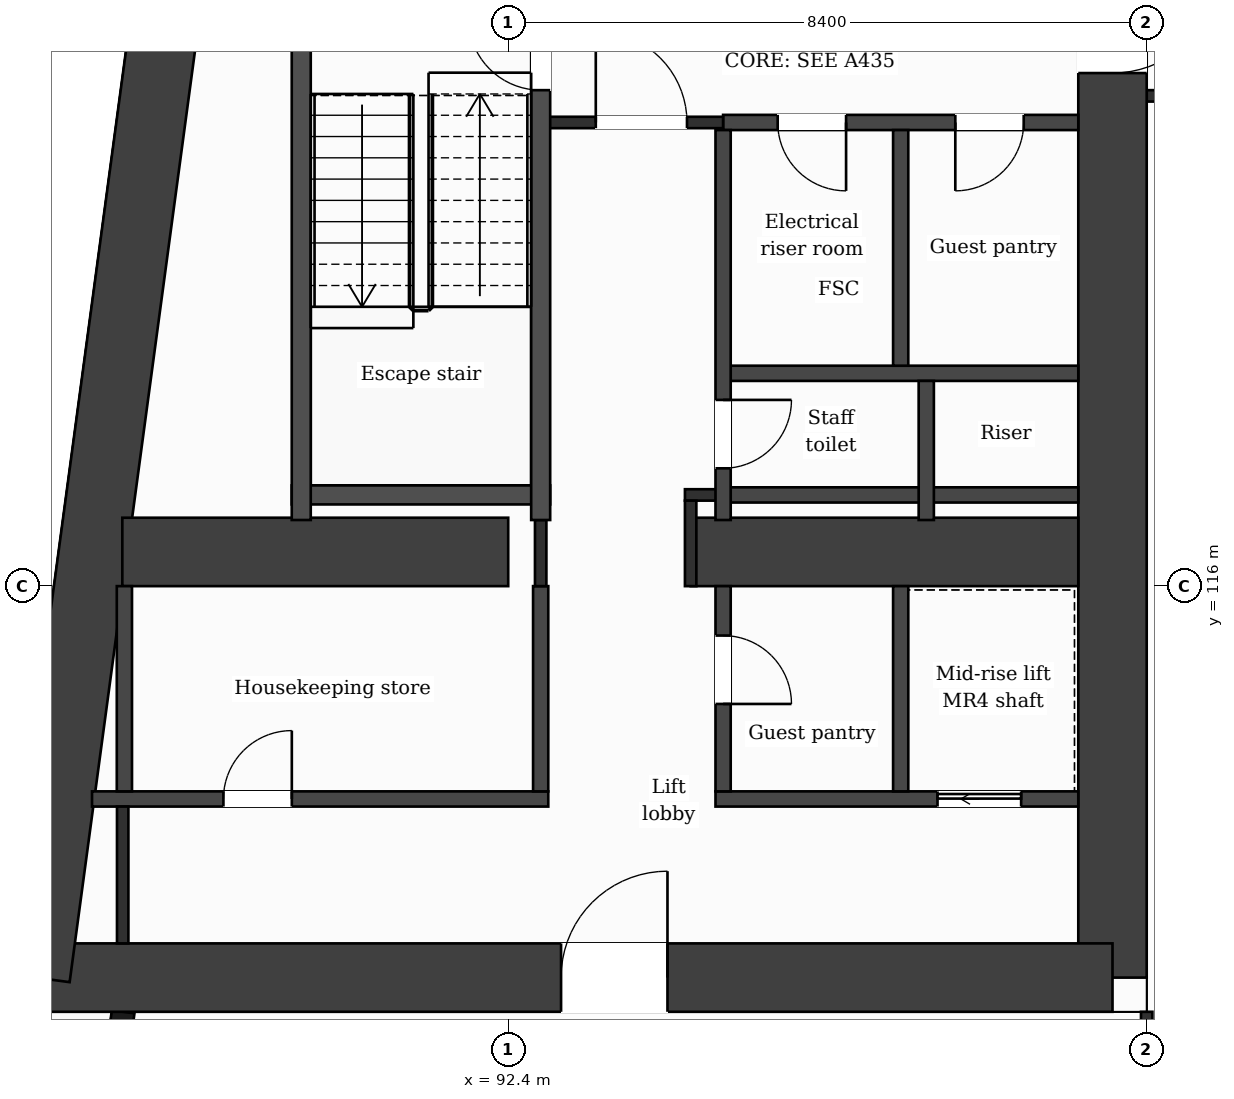
"""IFC4 building model, lengths in metres.
Left out: names, types, materials, properties, quantities, classifications, styles, units other than length and angle.
Written with IfcOpenShell. Run it as: python <this file> out.ifc"""

import sys

from ifc_helpers import new_model, si_unit, direction, frame, frame_2d, origin, place, context, subcontext, project, spatial, rectangle, extrude, element, fill, save


model = new_model("IFC4")
c1 = context("Model", 3, precision=1e-05, world=origin(), true_north=direction((0.0, 1.0)))
c2 = subcontext(c1, "Body", "Model", "MODEL_VIEW")
j1 = project(units=[si_unit("LENGTHUNIT", "METRE"), si_unit("PLANEANGLEUNIT", "RADIAN")], contexts=[c1])
p1 = place(None, origin())
s1 = spatial("IfcSite", under=j1, at=p1, CompositionType="ELEMENT")
p2 = place(p1, origin())
s2 = spatial("IfcBuilding", under=s1, at=p2, CompositionType="ELEMENT")
p3 = place(p2, frame((0.0, 0.0, 147.8)))
s3 = spatial("IfcBuildingStorey", under=s2, at=p3, CompositionType="ELEMENT", Elevation=147.8)
p4 = place(p3, frame((100.35, 131.95, 0.0), z_axis=(0.0, 0.0, 1.0), x_axis=(0.0, -1.0, 0.0)))
e1 = element("IfcWall", 1, at=p4, inside=s3, PredefinedType="SHEAR", context=c2, shape_type="SweptSolid", body=[
    extrude(rectangle(XDim=21.1, YDim=0.9, at=frame_2d((10.55, 0.0))), origin(), (0.0, 0.0, 1.0), 3.7),
])
p5 = place(p4, frame((7.8, 0.0, 0.0)))
e2 = element("IfcOpeningElement", 2, at=p5, cuts=e1, PredefinedType="OPENING", context=c2, shape_type="SweptSolid", body=[
    extrude(rectangle(XDim=1.4, YDim=2.1, at=frame_2d((0.7, 1.05))), frame((0.0, 0.46, 0.0), z_axis=(0.0, -1.0, 0.0), x_axis=(1.0, 0.0, 0.0)), (0.0, 0.0, 1.0), 0.92),
])
p6 = place(p3, frame((100.35, 110.85, 0.0), z_axis=(0.0, 0.0, 1.0), x_axis=(-1.0, 0.0, 0.0)))
e3 = element("IfcWall", 3, at=p6, inside=s3, PredefinedType="SHEAR", context=c2, shape_type="SweptSolid", body=[
    extrude(rectangle(XDim=14.166, YDim=0.9, at=frame_2d((7.083, 0.0))), origin(), (0.0, 0.0, 1.0), 3.7),
])
p7 = place(p6, frame((5.855, 0.0, 0.0)))
e4 = element("IfcOpeningElement", 4, at=p7, cuts=e3, PredefinedType="OPENING", context=c2, shape_type="SweptSolid", body=[
    extrude(rectangle(XDim=1.4, YDim=2.1, at=frame_2d((0.7, 1.05))), frame((0.0, 0.46, 0.0), z_axis=(0.0, -1.0, 0.0), x_axis=(1.0, 0.0, 0.0)), (0.0, 0.0, 1.0), 0.92),
])
p8 = place(p3, frame((86.184, 110.85, 0.0), z_axis=(0.0, 0.0, 1.0), x_axis=(0.133410495943, 0.991060865725, 0.0)))
e5 = element("IfcWall", 5, at=p8, inside=s3, PredefinedType="SHEAR", context=c2, shape_type="SweptSolid", body=[
    extrude(rectangle(XDim=21.29, YDim=0.9, at=frame_2d((10.645, 0.0))), origin(), (0.0, 0.0, 1.0), 3.7),
])
p9 = place(p3, frame((87.323, 116.45, 0.0), z_axis=(0.0, 0.0, 1.0), x_axis=(1.0, 0.0, 0.0)))
e6 = element("IfcWall", 6, at=p9, inside=s3, PredefinedType="SHEAR", context=c2, shape_type="SweptSolid", body=[
    extrude(rectangle(XDim=5.077, YDim=0.9, at=frame_2d((2.539, 0.0))), origin(), (0.0, 0.0, 1.0), 3.7),
])
p10 = place(p3, frame((94.8, 116.45, 0.0), z_axis=(0.0, 0.0, 1.0), x_axis=(1.0, 0.0, 0.0)))
e7 = element("IfcWall", 7, at=p10, inside=s3, PredefinedType="SHEAR", context=c2, shape_type="SweptSolid", body=[
    extrude(rectangle(XDim=5.1, YDim=0.9, at=frame_2d((2.55, 0.0))), origin(), (0.0, 0.0, 1.0), 3.7),
])
p11 = place(p3, frame((87.334, 110.4, 0.0), z_axis=(0.0, 0.0, 1.0), x_axis=(-0.133437175554, -0.991057273915, 0.0)))
e8 = element("IfcWall", 8, at=p11, inside=s3, PredefinedType="SOLIDWALL", context=c2, shape_type="SweptSolid", body=[
    extrude(rectangle(XDim=6.781, YDim=0.3, at=frame_2d((3.39, 0.0))), origin(), (0.0, 0.0, 1.0), 3.38),
])
p12 = place(p11, frame((1.418, 0.0, 0.0)))
e9 = element("IfcOpeningElement", 9, at=p12, cuts=e8, PredefinedType="OPENING", context=c2, shape_type="SweptSolid", body=[
    extrude(rectangle(XDim=1.2, YDim=2.4, at=frame_2d((0.6, 1.2))), frame((0.0, 0.16, 0.0), z_axis=(0.0, -1.0, 0.0), x_axis=(1.0, 0.0, 0.0)), (0.0, 0.0, 1.0), 0.32),
])
p13 = place(p11, frame((4.758, 0.0, 0.9)))
e10 = element("IfcOpeningElement", 10, at=p13, cuts=e8, PredefinedType="OPENING", context=c2, shape_type="SweptSolid", body=[
    extrude(rectangle(XDim=1.2, YDim=2.1, at=frame_2d((0.6, 1.05))), frame((0.0, 0.16, 0.0), z_axis=(0.0, -1.0, 0.0), x_axis=(1.0, 0.0, 0.0)), (0.0, 0.0, 1.0), 0.32),
])
p14 = place(p3, frame((86.924, 113.2, 0.0), z_axis=(0.0, 0.0, 1.0), x_axis=(1.0, 0.0, 0.0)))
e11 = element("IfcWall", 11, at=p14, inside=s3, PredefinedType="PARTITIONING", context=c2, shape_type="SweptSolid", body=[
    extrude(rectangle(XDim=6.003, YDim=0.2, at=frame_2d((3.001, 0.0))), origin(), (0.0, 0.0, 1.0), 3.38),
])
p15 = place(p14, frame((1.729, 0.0, 0.0)))
e12 = element("IfcOpeningElement", 12, at=p15, cuts=e11, PredefinedType="OPENING", context=c2, shape_type="SweptSolid", body=[
    extrude(rectangle(XDim=0.9, YDim=2.1, at=frame_2d((0.45, 1.05))), frame((0.0, 0.11, 0.0), z_axis=(0.0, -1.0, 0.0), x_axis=(1.0, 0.0, 0.0)), (0.0, 0.0, 1.0), 0.22),
])
p16 = place(p3, frame((95.127, 113.2, 0.0), z_axis=(0.0, 0.0, 1.0), x_axis=(1.0, 0.0, 0.0)))
e13 = element("IfcWall", 13, at=p16, inside=s3, PredefinedType="PARTITIONING", context=c2, shape_type="SweptSolid", body=[
    extrude(rectangle(XDim=4.773, YDim=0.2, at=frame_2d((2.386, 0.0))), origin(), (0.0, 0.0, 1.0), 3.38),
])
p17 = place(p16, frame((2.921, 0.0, 0.0)))
e14 = element("IfcOpeningElement", 14, at=p17, cuts=e13, PredefinedType="OPENING", context=c2, shape_type="SweptSolid", body=[
    extrude(rectangle(XDim=1.1, YDim=2.1, at=frame_2d((0.55, 1.05))), frame((0.0, 0.11, 0.0), z_axis=(0.0, -1.0, 0.0), x_axis=(1.0, 0.0, 0.0)), (0.0, 0.0, 1.0), 0.22),
])
p18 = place(p3, frame((95.227, 117.2, 0.0), z_axis=(0.0, 0.0, 1.0), x_axis=(1.0, 0.0, 0.0)))
e15 = element("IfcWall", 15, at=p18, inside=s3, PredefinedType="PARTITIONING", context=c2, shape_type="SweptSolid", body=[
    extrude(rectangle(XDim=4.673, YDim=0.2, at=frame_2d((2.336, 0.0))), origin(), (0.0, 0.0, 1.0), 3.38),
])
p19 = place(p3, frame((94.725, 117.2, 0.0), z_axis=(0.0, 0.0, 1.0), x_axis=(1.0, 0.0, 0.0)))
e16 = element("IfcWall", 16, at=p19, inside=s3, PredefinedType="PARTITIONING", context=c2, shape_type="SweptSolid", body=[
    extrude(rectangle(XDim=0.502, YDim=0.15, at=frame_2d((0.251, 0.0))), origin(), (0.0, 0.0, 1.0), 3.38),
])
p20 = place(p3, frame((89.552, 117.2, 0.0), z_axis=(0.0, 0.0, 1.0), x_axis=(1.0, 0.0, 0.0)))
e17 = element("IfcWall", 17, at=p20, inside=s3, PredefinedType="PARTITIONING", context=c2, shape_type="SweptSolid", body=[
    extrude(rectangle(XDim=3.4, YDim=0.25, at=frame_2d((1.7, 0.0))), origin(), (0.0, 0.0, 1.0), 3.38),
])
p21 = place(p3, frame((95.227, 118.8, 0.0), z_axis=(0.0, 0.0, 1.0), x_axis=(1.0, 0.0, 0.0)))
e18 = element("IfcWall", 18, at=p21, inside=s3, PredefinedType="PARTITIONING", context=c2, shape_type="SweptSolid", body=[
    extrude(rectangle(XDim=4.673, YDim=0.2, at=frame_2d((2.336, 0.0))), origin(), (0.0, 0.0, 1.0), 3.38),
])
p22 = place(p3, frame((95.227, 122.1, 0.0), z_axis=(0.0, 0.0, 1.0), x_axis=(1.0, 0.0, 0.0)))
e19 = element("IfcWall", 19, at=p22, inside=s3, PredefinedType="PARTITIONING", context=c2, shape_type="SweptSolid", body=[
    extrude(rectangle(XDim=4.673, YDim=0.2, at=frame_2d((2.336, 0.0))), origin(), (0.0, 0.0, 1.0), 3.38),
])
p23 = place(p22, frame((0.718, 0.0, 0.0)))
e20 = element("IfcOpeningElement", 20, at=p23, cuts=e19, PredefinedType="OPENING", context=c2, shape_type="SweptSolid", body=[
    extrude(rectangle(XDim=0.9, YDim=2.1, at=frame_2d((0.45, 1.05))), frame((0.0, 0.11, 0.0), z_axis=(0.0, -1.0, 0.0), x_axis=(1.0, 0.0, 0.0)), (0.0, 0.0, 1.0), 0.22),
])
p24 = place(p22, frame((3.055, 0.0, 0.0)))
e21 = element("IfcOpeningElement", 21, at=p24, cuts=e19, PredefinedType="OPENING", context=c2, shape_type="SweptSolid", body=[
    extrude(rectangle(XDim=0.9, YDim=2.1, at=frame_2d((0.45, 1.05))), frame((0.0, 0.11, 0.0), z_axis=(0.0, -1.0, 0.0), x_axis=(1.0, 0.0, 0.0)), (0.0, 0.0, 1.0), 0.22),
])
p25 = place(p3, frame((92.827, 122.1, 0.0), z_axis=(0.0, 0.0, 1.0), x_axis=(1.0, 0.0, 0.0)))
e22 = element("IfcWall", 22, at=p25, inside=s3, PredefinedType="PARTITIONING", context=c2, shape_type="SweptSolid", body=[
    extrude(rectangle(XDim=2.4, YDim=0.15, at=frame_2d((1.2, 0.0))), origin(), (0.0, 0.0, 1.0), 3.38),
])
p26 = place(p25, frame((0.725, 0.0, 0.0)))
e23 = element("IfcOpeningElement", 23, at=p26, cuts=e22, PredefinedType="OPENING", context=c2, shape_type="SweptSolid", body=[
    extrude(rectangle(XDim=1.2, YDim=2.1, at=frame_2d((0.6, 1.05))), frame((0.0, 0.085, 0.0), z_axis=(0.0, -1.0, 0.0), x_axis=(1.0, 0.0, 0.0)), (0.0, 0.0, 1.0), 0.17),
])
p27 = place(p3, frame((100.8, 122.45, 0.0), z_axis=(0.0, 0.0, 1.0), x_axis=(1.0, 0.0, 0.0)))
e24 = element("IfcWall", 24, at=p27, inside=s3, PredefinedType="PARTITIONING", context=c2, shape_type="SweptSolid", body=[
    extrude(rectangle(XDim=25.2, YDim=0.15, at=frame_2d((12.6, 0.0))), origin(), (0.0, 0.0, 1.0), 3.38),
])
p28 = place(p3, frame((87.35, 113.3, 0.0), z_axis=(0.0, 0.0, 1.0), x_axis=(0.0, 1.0, 0.0)))
e25 = element("IfcWall", 25, at=p28, inside=s3, PredefinedType="PARTITIONING", context=c2, shape_type="SweptSolid", body=[
    extrude(rectangle(XDim=2.7, YDim=0.2, at=frame_2d((1.35, 0.0))), origin(), (0.0, 0.0, 1.0), 3.38),
])
p29 = place(p3, frame((87.328, 111.3, 0.0), z_axis=(0.0, 0.0, 1.0), x_axis=(0.0, 1.0, 0.0)))
e26 = element("IfcWall", 26, at=p29, inside=s3, PredefinedType="PARTITIONING", context=c2, shape_type="SweptSolid", body=[
    extrude(rectangle(XDim=1.8, YDim=0.15, at=frame_2d((0.9, 0.0))), origin(), (0.0, 0.0, 1.0), 3.38),
])
p30 = place(p3, frame((89.677, 116.87, 0.0), z_axis=(0.0, 0.0, 1.0), x_axis=(0.0, 1.0, 0.0)))
e27 = element("IfcWall", 27, at=p30, inside=s3, PredefinedType="PARTITIONING", context=c2, shape_type="SweptSolid", body=[
    extrude(rectangle(XDim=6.955, YDim=0.25, at=frame_2d((3.478, 0.0))), origin(), (0.0, 0.0, 1.0), 3.38),
])
p31 = place(p3, frame((92.827, 113.3, 0.0), z_axis=(0.0, 0.0, 1.0), x_axis=(0.0, 1.0, 0.0)))
e28 = element("IfcWall", 28, at=p31, inside=s3, PredefinedType="PARTITIONING", context=c2, shape_type="SweptSolid", body=[
    extrude(rectangle(XDim=2.7, YDim=0.2, at=frame_2d((1.35, 0.0))), origin(), (0.0, 0.0, 1.0), 3.38),
])
p32 = place(p3, frame((92.827, 116.0, 0.0), z_axis=(0.0, 0.0, 1.0), x_axis=(0.0, 1.0, 0.0)))
e29 = element("IfcWall", 29, at=p32, inside=s3, PredefinedType="PARTITIONING", context=c2, shape_type="SweptSolid", body=[
    extrude(rectangle(XDim=0.87, YDim=0.15, at=frame_2d((0.435, 0.0))), origin(), (0.0, 0.0, 1.0), 3.38),
])
p33 = place(p3, frame((92.827, 116.87, 0.0), z_axis=(0.0, 0.0, 1.0), x_axis=(0.0, 1.0, 0.0)))
e30 = element("IfcWall", 30, at=p33, inside=s3, PredefinedType="PARTITIONING", context=c2, shape_type="SweptSolid", body=[
    extrude(rectangle(XDim=6.955, YDim=0.25, at=frame_2d((3.478, 0.0))), origin(), (0.0, 0.0, 1.0), 3.38),
])
p34 = place(p33, frame((5.655, 0.0, 0.0)))
e31 = element("IfcOpeningElement", 31, at=p34, cuts=e30, PredefinedType="OPENING", context=c2, shape_type="SweptSolid", body=[
    extrude(rectangle(XDim=0.95, YDim=2.1, at=frame_2d((0.475, 1.05))), frame((0.0, 0.135, 0.0), z_axis=(0.0, -1.0, 0.0), x_axis=(1.0, 0.0, 0.0)), (0.0, 0.0, 1.0), 0.27),
])
p35 = place(p3, frame((94.8, 116.0, 0.0), z_axis=(0.0, 0.0, 1.0), x_axis=(0.0, 1.0, 0.0)))
e32 = element("IfcWall", 32, at=p35, inside=s3, PredefinedType="PARTITIONING", context=c2, shape_type="SweptSolid", body=[
    extrude(rectangle(XDim=1.125, YDim=0.15, at=frame_2d((0.562, 0.0))), origin(), (0.0, 0.0, 1.0), 3.38),
])
p36 = place(p3, frame((95.227, 113.3, 0.0), z_axis=(0.0, 0.0, 1.0), x_axis=(0.0, 1.0, 0.0)))
e33 = element("IfcWall", 33, at=p36, inside=s3, PredefinedType="PARTITIONING", context=c2, shape_type="SweptSolid", body=[
    extrude(rectangle(XDim=2.7, YDim=0.2, at=frame_2d((1.35, 0.0))), origin(), (0.0, 0.0, 1.0), 3.38),
])
p37 = place(p36, frame((1.15, 0.0, 0.0)))
e34 = element("IfcOpeningElement", 34, at=p37, cuts=e33, PredefinedType="OPENING", context=c2, shape_type="SweptSolid", body=[
    extrude(rectangle(XDim=0.9, YDim=2.1, at=frame_2d((0.45, 1.05))), frame((0.0, 0.11, 0.0), z_axis=(0.0, -1.0, 0.0), x_axis=(1.0, 0.0, 0.0)), (0.0, 0.0, 1.0), 0.22),
])
p38 = place(p3, frame((95.227, 116.87, 0.0), z_axis=(0.0, 0.0, 1.0), x_axis=(0.0, 1.0, 0.0)))
e35 = element("IfcWall", 35, at=p38, inside=s3, PredefinedType="PARTITIONING", context=c2, shape_type="SweptSolid", body=[
    extrude(rectangle(XDim=5.13, YDim=0.2, at=frame_2d((2.565, 0.0))), origin(), (0.0, 0.0, 1.0), 3.38),
])
p39 = place(p38, frame((0.68, 0.0, 0.0)))
e36 = element("IfcOpeningElement", 36, at=p39, cuts=e35, PredefinedType="OPENING", context=c2, shape_type="SweptSolid", body=[
    extrude(rectangle(XDim=0.9, YDim=2.1, at=frame_2d((0.45, 1.05))), frame((0.0, 0.11, 0.0), z_axis=(0.0, -1.0, 0.0), x_axis=(1.0, 0.0, 0.0)), (0.0, 0.0, 1.0), 0.22),
])
p40 = place(p3, frame((97.563, 113.3, 0.0), z_axis=(0.0, 0.0, 1.0), x_axis=(0.0, 1.0, 0.0)))
e37 = element("IfcWall", 37, at=p40, inside=s3, PredefinedType="PARTITIONING", context=c2, shape_type="SweptSolid", body=[
    extrude(rectangle(XDim=2.7, YDim=0.2, at=frame_2d((1.35, 0.0))), origin(), (0.0, 0.0, 1.0), 3.38),
])
p41 = place(p3, frame((97.563, 118.9, 0.0), z_axis=(0.0, 0.0, 1.0), x_axis=(0.0, 1.0, 0.0)))
e38 = element("IfcWall", 38, at=p41, inside=s3, PredefinedType="PARTITIONING", context=c2, shape_type="SweptSolid", body=[
    extrude(rectangle(XDim=3.1, YDim=0.2, at=frame_2d((1.55, 0.0))), origin(), (0.0, 0.0, 1.0), 3.38),
])
p42 = place(p3, frame((97.9, 116.87, 0.0), z_axis=(0.0, 0.0, 1.0), x_axis=(0.0, 1.0, 0.0)))
e39 = element("IfcWall", 39, at=p42, inside=s3, PredefinedType="PARTITIONING", context=c2, shape_type="SweptSolid", body=[
    extrude(rectangle(XDim=1.83, YDim=0.2, at=frame_2d((0.915, 0.0))), origin(), (0.0, 0.0, 1.0), 3.38),
])
p43 = place(p3, frame((100.8, 109.075, 0.0), z_axis=(0.0, 0.0, 1.0), x_axis=(0.0, 1.0, 0.0)))
e40 = element("IfcWall", 40, at=p43, inside=s3, PredefinedType="PARTITIONING", context=c2, shape_type="SweptSolid", body=[
    extrude(rectangle(XDim=1.325, YDim=0.15, at=frame_2d((0.663, 0.0))), origin(), (0.0, 0.0, 1.0), 3.38),
])
p44 = place(p26, origin())
e41 = element("IfcDoor", 41, at=p44, inside=s3, OperationType="SINGLE_SWING_LEFT", PredefinedType="DOOR", context=c2, shape_type="SweptSolid", body=[
    extrude(rectangle(XDim=1.2, YDim=2.1, at=frame_2d((0.6, 1.05))), frame((0.0, 0.025, 0.0), z_axis=(0.0, -1.0, 0.0), x_axis=(1.0, 0.0, 0.0)), (0.0, 0.0, 1.0), 0.05),
])
fill(e23, e41)
p45 = place(p23, origin())
e42 = element("IfcDoor", 42, at=p45, inside=s3, OperationType="SINGLE_SWING_RIGHT", PredefinedType="DOOR", context=c2, shape_type="SweptSolid", body=[
    extrude(rectangle(XDim=0.9, YDim=2.1, at=frame_2d((0.45, 1.05))), frame((0.0, 0.025, 0.0), z_axis=(0.0, -1.0, 0.0), x_axis=(1.0, 0.0, 0.0)), (0.0, 0.0, 1.0), 0.05),
])
fill(e20, e42)
p46 = place(p24, origin())
e43 = element("IfcDoor", 43, at=p46, inside=s3, OperationType="SINGLE_SWING_LEFT", PredefinedType="DOOR", context=c2, shape_type="SweptSolid", body=[
    extrude(rectangle(XDim=0.9, YDim=2.1, at=frame_2d((0.45, 1.05))), frame((0.0, 0.025, 0.0), z_axis=(0.0, -1.0, 0.0), x_axis=(1.0, 0.0, 0.0)), (0.0, 0.0, 1.0), 0.05),
])
fill(e21, e43)
p47 = place(p34, origin())
e44 = element("IfcDoor", 44, at=p47, inside=s3, OperationType="SINGLE_SWING_RIGHT", PredefinedType="DOOR", context=c2, shape_type="SweptSolid", body=[
    extrude(rectangle(XDim=0.95, YDim=2.1, at=frame_2d((0.475, 1.05))), frame((0.0, 0.025, 0.0), z_axis=(0.0, -1.0, 0.0), x_axis=(1.0, 0.0, 0.0)), (0.0, 0.0, 1.0), 0.05),
])
fill(e31, e44)
p48 = place(p39, origin())
e45 = element("IfcDoor", 45, at=p48, inside=s3, OperationType="SINGLE_SWING_RIGHT", PredefinedType="DOOR", context=c2, shape_type="SweptSolid", body=[
    extrude(rectangle(XDim=0.9, YDim=2.1, at=frame_2d((0.45, 1.05))), frame((0.0, 0.025, 0.0), z_axis=(0.0, -1.0, 0.0), x_axis=(1.0, 0.0, 0.0)), (0.0, 0.0, 1.0), 0.05),
])
fill(e36, e45)
p49 = place(p17, origin())
e46 = element("IfcDoor", 46, at=p49, inside=s3, OperationType="SLIDING_TO_LEFT", PredefinedType="DOOR", context=c2, shape_type="SweptSolid", body=[
    extrude(rectangle(XDim=1.1, YDim=2.1, at=frame_2d((0.55, 1.05))), frame((0.0, 0.025, 0.0), z_axis=(0.0, -1.0, 0.0), x_axis=(1.0, 0.0, 0.0)), (0.0, 0.0, 1.0), 0.05),
])
fill(e14, e46)
p50 = place(p15, origin())
e47 = element("IfcDoor", 47, at=p50, inside=s3, OperationType="SINGLE_SWING_RIGHT", PredefinedType="DOOR", context=c2, shape_type="SweptSolid", body=[
    extrude(rectangle(XDim=0.9, YDim=2.1, at=frame_2d((0.45, 1.05))), frame((0.0, 0.025, 0.0), z_axis=(0.0, -1.0, 0.0), x_axis=(1.0, 0.0, 0.0)), (0.0, 0.0, 1.0), 0.05),
])
fill(e12, e47)
p51 = place(p37, origin())
e48 = element("IfcDoor", 48, at=p51, inside=s3, OperationType="SINGLE_SWING_LEFT", PredefinedType="DOOR", context=c2, shape_type="SweptSolid", body=[
    extrude(rectangle(XDim=0.9, YDim=2.1, at=frame_2d((0.45, 1.05))), frame((0.0, 0.025, 0.0), z_axis=(0.0, -1.0, 0.0), x_axis=(1.0, 0.0, 0.0)), (0.0, 0.0, 1.0), 0.05),
])
fill(e34, e48)
p52 = place(p7, origin())
e49 = element("IfcDoor", 49, at=p52, inside=s3, OperationType="SINGLE_SWING_LEFT", PredefinedType="DOOR", context=c2, shape_type="SweptSolid", body=[
    extrude(rectangle(XDim=1.4, YDim=2.1, at=frame_2d((0.7, 1.05))), frame((0.0, 0.025, 0.0), z_axis=(0.0, -1.0, 0.0), x_axis=(1.0, 0.0, 0.0)), (0.0, 0.0, 1.0), 0.05),
])
fill(e4, e49)
p53 = place(p5, origin())
e50 = element("IfcDoor", 50, at=p53, inside=s3, OperationType="SINGLE_SWING_LEFT", PredefinedType="DOOR", context=c2, shape_type="SweptSolid", body=[
    extrude(rectangle(XDim=1.4, YDim=2.1, at=frame_2d((0.7, 1.05))), frame((0.0, 0.025, 0.0), z_axis=(0.0, -1.0, 0.0), x_axis=(1.0, 0.0, 0.0)), (0.0, 0.0, 1.0), 0.05),
])
fill(e2, e50)
save(model, sys.argv[1])
